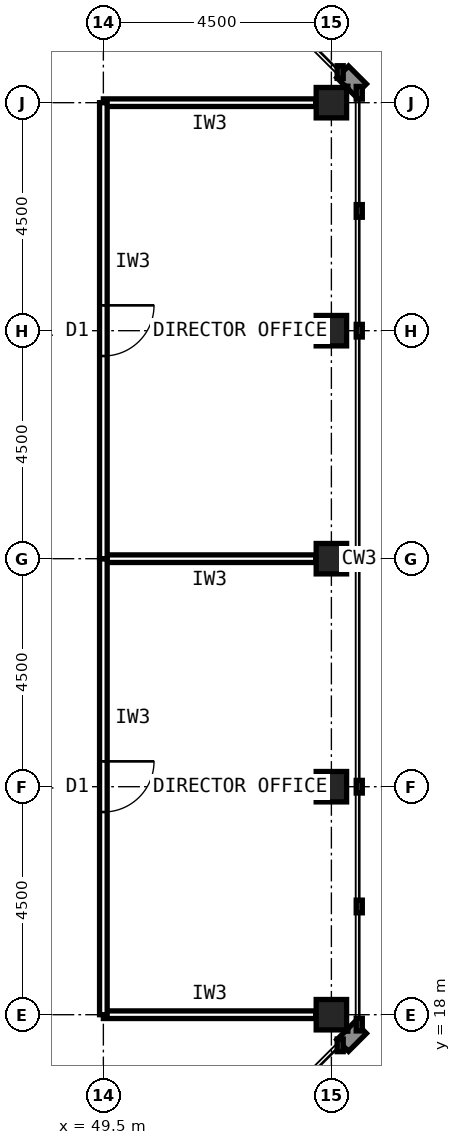
"""IFC4 building model, lengths in metres.
Left out: names, types, materials, properties, quantities, classifications, styles, units other than length and angle.
Written with IfcOpenShell. Run it as: python <this file> out.ifc"""

import sys

from ifc_helpers import new_model, si_unit, direction, frame, frame_2d, origin, origin_2d, place, context, subcontext, project, spatial, rectangle, hollow_rectangle, extrude, element, fill, save


model = new_model("IFC4")
c1 = context("Model", 3, precision=1e-05, world=origin(), true_north=direction((0.0, 1.0)))
c2 = subcontext(c1, "Body", "Model", "MODEL_VIEW")
j1 = project(units=[si_unit("LENGTHUNIT", "METRE"), si_unit("PLANEANGLEUNIT", "RADIAN")], contexts=[c1])
p1 = place(None, origin())
s1 = spatial("IfcSite", under=j1, at=p1, CompositionType="ELEMENT")
p2 = place(p1, origin())
s2 = spatial("IfcBuilding", under=s1, at=p2, CompositionType="ELEMENT")
p3 = place(p2, frame((0.0, 0.0, 278.6)))
s3 = spatial("IfcBuildingStorey", under=s2, at=p3, CompositionType="ELEMENT", Elevation=278.6)
for number, where, z_axis, x_axis in (
    (1, (54.0, 18.0, 0.0), (0.0, 0.0, 1.0), (1.0, 0.0, 0.0)),
    (2, (54.0, 22.5, 0.0), (0.0, 0.0, 1.0), (1.0, 0.0, 0.0)),
    (3, (54.0, 27.0, 0.0), (0.0, 0.0, 1.0), (1.0, 0.0, 0.0)),
    (4, (54.0, 31.5, 0.0), (0.0, 0.0, 1.0), (1.0, 0.0, 0.0)),
    (5, (54.0, 36.0, 0.0), (0.0, 0.0, 1.0), (1.0, 0.0, 0.0)),
):
    element("IfcColumn", number, at=place(p3, frame(where, z_axis=z_axis, x_axis=x_axis)), inside=s3, PredefinedType="COLUMN", context=c2, shape_type="SweptSolid", body=[
        extrude(hollow_rectangle(XDim=0.6, YDim=0.6, WallThickness=0.028, at=origin_2d()), origin(), (0.0, 0.0, 1.0), 4.0),
    ])
for number, where, z_axis, x_axis in (
    (6, (49.5, 18.0, 0.0), (0.0, 0.0, 1.0), (1.0, 0.0, 0.0)),
    (7, (53.69, 27.0, 0.0), (0.0, 0.0, 1.0), (-1.0, 0.0, 0.0)),
):
    element("IfcWall", number, at=place(p3, frame(where, z_axis=z_axis, x_axis=x_axis)), inside=s3, PredefinedType="PARTITIONING", context=c2, shape_type="SweptSolid", body=[
        extrude(rectangle(XDim=4.19, YDim=0.15, at=frame_2d((2.095, 0.0))), origin(), (0.0, 0.0, 1.0), 2.989),
    ])
p4 = place(p3, frame((49.5, 27.0, 0.0), z_axis=(0.0, 0.0, 1.0), x_axis=(0.0, -1.0, 0.0)))
e8 = element("IfcWall", 8, at=p4, inside=s3, PredefinedType="PARTITIONING", context=c2, shape_type="SweptSolid", body=[
    extrude(rectangle(XDim=9.0, YDim=0.15, at=frame_2d((4.5, 0.0))), origin(), (0.0, 0.0, 1.0), 3.84),
])
p5 = place(p4, frame((4.0, 0.0, 0.0)))
e9 = element("IfcOpeningElement", 9, at=p5, cuts=e8, PredefinedType="OPENING", context=c2, shape_type="SweptSolid", body=[
    extrude(rectangle(XDim=1.0, YDim=2.1, at=frame_2d((0.5, 1.05))), frame((0.0, 0.085, 0.0), z_axis=(0.0, -1.0, 0.0), x_axis=(1.0, 0.0, 0.0)), (0.0, 0.0, 1.0), 0.17),
])
p6 = place(p3, frame((53.69, 36.0, 0.0), z_axis=(0.0, 0.0, 1.0), x_axis=(-1.0, 0.0, 0.0)))
e10 = element("IfcWall", 10, at=p6, inside=s3, PredefinedType="PARTITIONING", context=c2, shape_type="SweptSolid", body=[
    extrude(rectangle(XDim=4.19, YDim=0.15, at=frame_2d((2.095, 0.0))), origin(), (0.0, 0.0, 1.0), 2.989),
])
p7 = place(p3, frame((49.5, 36.0, 0.0), z_axis=(0.0, 0.0, 1.0), x_axis=(0.0, -1.0, 0.0)))
e11 = element("IfcWall", 11, at=p7, inside=s3, PredefinedType="PARTITIONING", context=c2, shape_type="SweptSolid", body=[
    extrude(rectangle(XDim=9.0, YDim=0.15, at=frame_2d((4.5, 0.0))), origin(), (0.0, 0.0, 1.0), 3.84),
])
p8 = place(p7, frame((4.0, 0.0, 0.0)))
e12 = element("IfcOpeningElement", 12, at=p8, cuts=e11, PredefinedType="OPENING", context=c2, shape_type="SweptSolid", body=[
    extrude(rectangle(XDim=1.0, YDim=2.1, at=frame_2d((0.5, 1.05))), frame((0.0, 0.085, 0.0), z_axis=(0.0, -1.0, 0.0), x_axis=(1.0, 0.0, 0.0)), (0.0, 0.0, 1.0), 0.17),
])
p9 = place(p5, origin())
e13 = element("IfcDoor", 13, at=p9, inside=s3, OperationType="SINGLE_SWING_LEFT", PredefinedType="DOOR", context=c2, shape_type="SweptSolid", body=[
    extrude(rectangle(XDim=1.0, YDim=2.1, at=frame_2d((0.5, 1.05))), frame((0.0, 0.025, 0.0), z_axis=(0.0, -1.0, 0.0), x_axis=(1.0, 0.0, 0.0)), (0.0, 0.0, 1.0), 0.05),
])
fill(e9, e13)
p10 = place(p8, origin())
e14 = element("IfcDoor", 14, at=p10, inside=s3, OperationType="SINGLE_SWING_LEFT", PredefinedType="DOOR", context=c2, shape_type="SweptSolid", body=[
    extrude(rectangle(XDim=1.0, YDim=2.1, at=frame_2d((0.5, 1.05))), frame((0.0, 0.025, 0.0), z_axis=(0.0, -1.0, 0.0), x_axis=(1.0, 0.0, 0.0)), (0.0, 0.0, 1.0), 0.05),
])
fill(e12, e14)
save(model, sys.argv[1])
